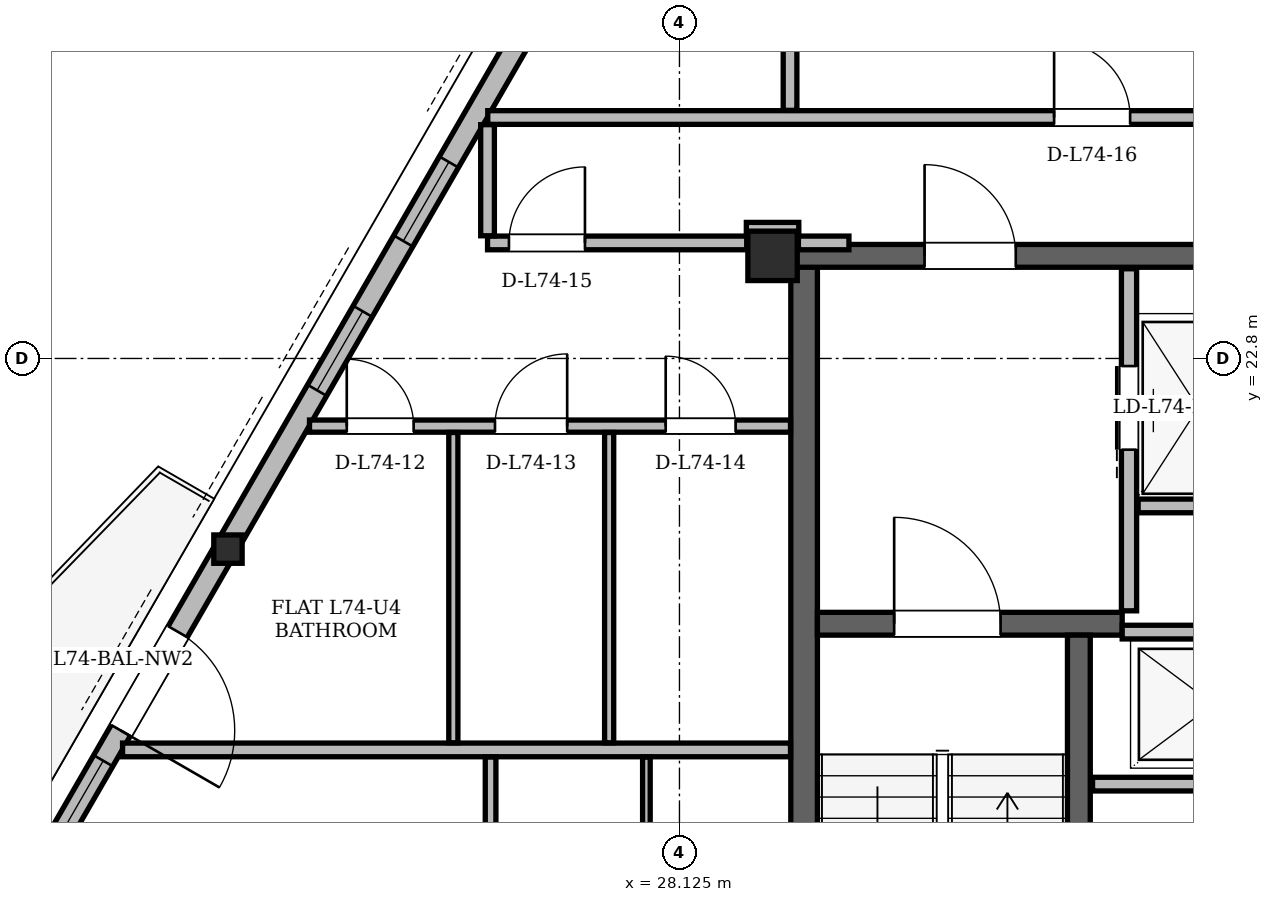
"""IFC4 building model, lengths in metres.
Left out: names, types, materials, properties, quantities, classifications, styles, units other than length and angle.
Written with IfcOpenShell. Run it as: python <this file> out.ifc"""

import sys

from ifc_helpers import new_model, si_unit, direction, frame, frame_2d, origin, origin_2d, place, context, subcontext, project, spatial, rectangle, hollow_rectangle, i_section, extrude, element, fill, save


model = new_model("IFC4")
c1 = context("Model", 3, precision=1e-05, world=origin(), true_north=direction((0.0, 1.0)))
c2 = subcontext(c1, "Body", "Model", "MODEL_VIEW")
j1 = project(units=[si_unit("LENGTHUNIT", "METRE"), si_unit("PLANEANGLEUNIT", "RADIAN")], contexts=[c1])
p1 = place(None, origin())
s1 = spatial("IfcSite", under=j1, at=p1, CompositionType="ELEMENT")
p2 = place(p1, origin())
s2 = spatial("IfcBuilding", under=s1, at=p2, CompositionType="ELEMENT")
p3 = place(p2, frame((0.0, 0.0, 281.1)))
s3 = spatial("IfcBuildingStorey", under=s2, at=p3, CompositionType="ELEMENT", Elevation=281.1)
p4 = place(p3, frame((29.35, 24.15, 0.0), z_axis=(0.0, 0.0, 1.0), x_axis=(1.0, 0.0, 0.0)))
e1 = element("IfcColumn", 1, at=p4, inside=s3, PredefinedType="COLUMN", context=c2, shape_type="SweptSolid", body=[
    extrude(hollow_rectangle(XDim=0.65, YDim=0.65, WallThickness=0.05, at=origin_2d()), origin(), (0.0, 0.0, 1.0), 3.9),
])
p5 = place(p3, frame((22.162, 20.31, 0.004), z_axis=(0.011731624298, -0.00953586574, 0.999885711597), x_axis=(0.630748834941, 0.775987053513, 0.0)))
e2 = element("IfcColumn", 2, at=p5, inside=s3, PredefinedType="COLUMN", context=c2, shape_type="SweptSolid", body=[
    extrude(i_section(OverallWidth=0.373, OverallDepth=0.373, WebThickness=0.016, FlangeThickness=0.026, at=origin_2d()), origin(), (0.0, 0.0, 1.0), 3.892),
])
p6 = place(p3, frame((29.765, 11.0, 0.0), z_axis=(0.0, 0.0, 1.0), x_axis=(0.0, 1.0, 0.0)))
e3 = element("IfcWall", 3, at=p6, inside=s3, PredefinedType="SHEAR", context=c2, shape_type="SweptSolid", body=[
    extrude(rectangle(XDim=13.3, YDim=0.35, at=frame_2d((6.65, 0.0))), origin(), (0.0, 0.0, 1.0), 3.68),
])
p7 = place(p3, frame((29.65, 24.15, 0.0), z_axis=(0.0, 0.0, 1.0), x_axis=(1.0, 0.0, 0.0)))
e4 = element("IfcWall", 4, at=p7, inside=s3, PredefinedType="SHEAR", context=c2, shape_type="SweptSolid", body=[
    extrude(rectangle(XDim=15.7, YDim=0.3, at=frame_2d((7.85, 0.0))), origin(), (0.0, 0.0, 1.0), 3.68),
])
p8 = place(p7, frame((1.7, 0.0, 0.0)))
e5 = element("IfcOpeningElement", 5, at=p8, cuts=e4, PredefinedType="OPENING", context=c2, shape_type="SweptSolid", body=[
    extrude(rectangle(XDim=1.2, YDim=2.2, at=frame_2d((0.6, 1.1))), frame((0.0, 0.15, 0.0), z_axis=(0.0, -1.0, 0.0), x_axis=(1.0, 0.0, 0.0)), (0.0, 0.0, 1.0), 0.3),
])
p9 = place(p7, frame((12.8, 0.0, 0.0)))
e6 = element("IfcOpeningElement", 6, at=p9, cuts=e4, PredefinedType="OPENING", context=c2, shape_type="SweptSolid", body=[
    extrude(rectangle(XDim=1.2, YDim=2.2, at=frame_2d((0.6, 1.1))), frame((0.0, 0.15, 0.0), z_axis=(0.0, -1.0, 0.0), x_axis=(1.0, 0.0, 0.0)), (0.0, 0.0, 1.0), 0.3),
])
p10 = place(p7, frame((6.55, 0.0, 0.0)))
e7 = element("IfcOpeningElement", 7, at=p10, cuts=e4, PredefinedType="OPENING", context=c2, shape_type="SweptSolid", body=[
    extrude(rectangle(XDim=0.9, YDim=2.05, at=frame_2d((0.45, 1.025))), frame((0.0, 0.15, 0.0), z_axis=(0.0, -1.0, 0.0), x_axis=(1.0, 0.0, 0.0)), (0.0, 0.0, 1.0), 0.3),
])
p11 = place(p7, frame((8.45, 0.0, 0.0)))
e8 = element("IfcOpeningElement", 8, at=p11, cuts=e4, PredefinedType="OPENING", context=c2, shape_type="SweptSolid", body=[
    extrude(rectangle(XDim=0.9, YDim=2.05, at=frame_2d((0.45, 1.025))), frame((0.0, 0.15, 0.0), z_axis=(0.0, -1.0, 0.0), x_axis=(1.0, 0.0, 0.0)), (0.0, 0.0, 1.0), 0.3),
])
p12 = place(p3, frame((29.94, 19.31, 0.0), z_axis=(0.0, 0.0, 1.0), x_axis=(1.0, 0.0, 0.0)))
e9 = element("IfcWall", 9, at=p12, inside=s3, PredefinedType="SHEAR", context=c2, shape_type="SweptSolid", body=[
    extrude(rectangle(XDim=4.01, YDim=0.3, at=frame_2d((2.005, 0.0))), origin(), (0.0, 0.0, 1.0), 3.68),
])
p13 = place(p12, frame((1.01, 0.0, 0.0)))
e10 = element("IfcOpeningElement", 10, at=p13, cuts=e9, PredefinedType="OPENING", context=c2, shape_type="SweptSolid", body=[
    extrude(rectangle(XDim=1.4, YDim=2.2, at=frame_2d((0.7, 1.1))), frame((0.0, 0.15, 0.0), z_axis=(0.0, -1.0, 0.0), x_axis=(1.0, 0.0, 0.0)), (0.0, 0.0, 1.0), 0.3),
])
p14 = place(p3, frame((33.38, 11.54, 0.0), z_axis=(0.0, 0.0, 1.0), x_axis=(0.0, 1.0, 0.0)))
e11 = element("IfcWall", 11, at=p14, inside=s3, PredefinedType="SHEAR", context=c2, shape_type="SweptSolid", body=[
    extrude(rectangle(XDim=7.62, YDim=0.3, at=frame_2d((3.81, 0.0))), origin(), (0.0, 0.0, 1.0), 3.68),
])
p15 = place(p3, frame((35.264, 43.004, 0.0), z_axis=(0.0, 0.0, 1.0), x_axis=(-0.500002460556, -0.866023983177, 0.0)))
e12 = element("IfcWall", 12, at=p15, inside=s3, PredefinedType="SOLIDWALL", context=c2, shape_type="SweptSolid", body=[
    extrude(rectangle(XDim=37.435, YDim=0.29, at=frame_2d((18.718, 0.0))), origin(), (0.0, 0.0, 1.0), 3.058),
])
p16 = place(p15, frame((3.639, 0.0, 0.0)))
e13 = element("IfcOpeningElement", 13, at=p16, cuts=e12, PredefinedType="OPENING", context=c2, shape_type="SweptSolid", body=[
    extrude(rectangle(XDim=1.5, YDim=2.2, at=frame_2d((0.75, 1.1))), frame((0.0, 0.145, 0.0), z_axis=(0.0, -1.0, 0.0), x_axis=(1.0, 0.0, 0.0)), (0.0, 0.0, 1.0), 0.29),
])
p17 = place(p15, frame((27.481, 0.0, 0.0)))
e14 = element("IfcOpeningElement", 14, at=p17, cuts=e12, PredefinedType="OPENING", context=c2, shape_type="SweptSolid", body=[
    extrude(rectangle(XDim=1.5, YDim=2.2, at=frame_2d((0.75, 1.1))), frame((0.0, 0.145, 0.0), z_axis=(0.0, -1.0, 0.0), x_axis=(1.0, 0.0, 0.0)), (0.0, 0.0, 1.0), 0.29),
])
p18 = place(p15, frame((35.251, 0.0, 0.85)))
e15 = element("IfcOpeningElement", 15, at=p18, cuts=e12, PredefinedType="OPENING", context=c2, shape_type="SweptSolid", body=[
    extrude(rectangle(XDim=1.2, YDim=1.48, at=frame_2d((0.6, 0.74))), frame((0.0, 0.145, 0.0), z_axis=(0.0, -1.0, 0.0), x_axis=(1.0, 0.0, 0.0)), (0.0, 0.0, 1.0), 0.29),
])
p19 = place(p15, frame((29.441, 0.0, 0.85)))
e16 = element("IfcOpeningElement", 16, at=p19, cuts=e12, PredefinedType="OPENING", context=c2, shape_type="SweptSolid", body=[
    extrude(rectangle(XDim=1.2, YDim=1.48, at=frame_2d((0.6, 0.74))), frame((0.0, 0.145, 0.0), z_axis=(0.0, -1.0, 0.0), x_axis=(1.0, 0.0, 0.0)), (0.0, 0.0, 1.0), 0.29),
])
p20 = place(p15, frame((32.709, 0.0, 0.85)))
e17 = element("IfcOpeningElement", 17, at=p20, cuts=e12, PredefinedType="OPENING", context=c2, shape_type="SweptSolid", body=[
    extrude(rectangle(XDim=1.2, YDim=1.48, at=frame_2d((0.6, 0.74))), frame((0.0, 0.145, 0.0), z_axis=(0.0, -1.0, 0.0), x_axis=(1.0, 0.0, 0.0)), (0.0, 0.0, 1.0), 0.29),
])
p21 = place(p15, frame((20.345, 0.0, 0.85)))
e18 = element("IfcOpeningElement", 18, at=p21, cuts=e12, PredefinedType="OPENING", context=c2, shape_type="SweptSolid", body=[
    extrude(rectangle(XDim=1.2, YDim=1.48, at=frame_2d((0.6, 0.74))), frame((0.0, 0.145, 0.0), z_axis=(0.0, -1.0, 0.0), x_axis=(1.0, 0.0, 0.0)), (0.0, 0.0, 1.0), 0.29),
])
p22 = place(p15, frame((22.614, 0.0, 0.85)))
e19 = element("IfcOpeningElement", 19, at=p22, cuts=e12, PredefinedType="OPENING", context=c2, shape_type="SweptSolid", body=[
    extrude(rectangle(XDim=1.2, YDim=1.48, at=frame_2d((0.6, 0.74))), frame((0.0, 0.145, 0.0), z_axis=(0.0, -1.0, 0.0), x_axis=(1.0, 0.0, 0.0)), (0.0, 0.0, 1.0), 0.29),
])
p23 = place(p15, frame((1.862, 0.0, 0.85)))
e20 = element("IfcOpeningElement", 20, at=p23, cuts=e12, PredefinedType="OPENING", context=c2, shape_type="SweptSolid", body=[
    extrude(rectangle(XDim=1.2, YDim=1.48, at=frame_2d((0.6, 0.74))), frame((0.0, 0.145, 0.0), z_axis=(0.0, -1.0, 0.0), x_axis=(1.0, 0.0, 0.0)), (0.0, 0.0, 1.0), 0.29),
])
p24 = place(p15, frame((8.825, 0.0, 0.85)))
e21 = element("IfcOpeningElement", 21, at=p24, cuts=e12, PredefinedType="OPENING", context=c2, shape_type="SweptSolid", body=[
    extrude(rectangle(XDim=1.2, YDim=1.48, at=frame_2d((0.6, 0.74))), frame((0.0, 0.145, 0.0), z_axis=(0.0, -1.0, 0.0), x_axis=(1.0, 0.0, 0.0)), (0.0, 0.0, 1.0), 0.29),
])
p25 = place(p3, frame((34.04, 19.48, 0.0), z_axis=(0.0, 0.0, 1.0), x_axis=(0.0, 1.0, 0.0)))
e22 = element("IfcWall", 22, at=p25, inside=s3, PredefinedType="PARTITIONING", context=c2, shape_type="SweptSolid", body=[
    extrude(rectangle(XDim=4.5, YDim=0.2, at=frame_2d((2.25, 0.0))), origin(), (0.0, 0.0, 1.0), 3.68),
])
p26 = place(p25, frame((2.12, 0.0, 0.0)))
e23 = element("IfcOpeningElement", 23, at=p26, cuts=e22, PredefinedType="OPENING", context=c2, shape_type="SweptSolid", body=[
    extrude(rectangle(XDim=1.1, YDim=2.2, at=frame_2d((0.55, 1.1))), frame((0.0, 0.1, 0.0), z_axis=(0.0, -1.0, 0.0), x_axis=(1.0, 0.0, 0.0)), (0.0, 0.0, 1.0), 0.2),
])
p27 = place(p3, frame((34.16, 20.86, 0.0), z_axis=(0.0, 0.0, 1.0), x_axis=(1.0, 0.0, 0.0)))
e24 = element("IfcWall", 24, at=p27, inside=s3, PredefinedType="PARTITIONING", context=c2, shape_type="SweptSolid", body=[
    extrude(rectangle(XDim=1.58, YDim=0.18, at=frame_2d((0.79, 0.0))), origin(), (0.0, 0.0, 1.0), 3.68),
])
p28 = place(p3, frame((33.95, 19.2, 0.0), z_axis=(0.0, 0.0, 1.0), x_axis=(1.0, 0.0, 0.0)))
e25 = element("IfcWall", 25, at=p28, inside=s3, PredefinedType="PARTITIONING", context=c2, shape_type="SweptSolid", body=[
    extrude(rectangle(XDim=2.27, YDim=0.18, at=frame_2d((1.135, 0.0))), origin(), (0.0, 0.0, 1.0), 3.68),
])
p29 = place(p3, frame((33.56, 17.2, 0.0), z_axis=(0.0, 0.0, 1.0), x_axis=(1.0, 0.0, 0.0)))
e26 = element("IfcWall", 26, at=p29, inside=s3, PredefinedType="PARTITIONING", context=c2, shape_type="SweptSolid", body=[
    extrude(rectangle(XDim=2.66, YDim=0.18, at=frame_2d((1.33, 0.0))), origin(), (0.0, 0.0, 1.0), 3.68),
])
p30 = place(p3, frame((20.798, 17.65, 0.0), z_axis=(0.0, 0.0, 1.0), x_axis=(1.0, 0.0, 0.0)))
e27 = element("IfcWall", 27, at=p30, inside=s3, PredefinedType="PARTITIONING", context=c2, shape_type="SweptSolid", body=[
    extrude(rectangle(XDim=8.788, YDim=0.18, at=frame_2d((4.394, 0.0))), origin(), (0.0, 0.0, 1.0), 2.82),
])
p31 = place(p3, frame((23.258, 21.91, 0.0), z_axis=(0.0, 0.0, 1.0), x_axis=(1.0, 0.0, 0.0)))
e28 = element("IfcWall", 28, at=p31, inside=s3, PredefinedType="PARTITIONING", context=c2, shape_type="SweptSolid", body=[
    extrude(rectangle(XDim=6.328, YDim=0.16, at=frame_2d((3.164, 0.0))), origin(), (0.0, 0.0, 1.0), 2.82),
])
p32 = place(p31, frame((0.49, 0.0, 0.0)))
e29 = element("IfcOpeningElement", 29, at=p32, cuts=e28, PredefinedType="OPENING", context=c2, shape_type="SweptSolid", body=[
    extrude(rectangle(XDim=0.88, YDim=2.08, at=frame_2d((0.44, 1.04))), frame((0.0, 0.08, 0.0), z_axis=(0.0, -1.0, 0.0), x_axis=(1.0, 0.0, 0.0)), (0.0, 0.0, 1.0), 0.16),
])
p33 = place(p31, frame((2.44, 0.0, 0.0)))
e30 = element("IfcOpeningElement", 30, at=p33, cuts=e28, PredefinedType="OPENING", context=c2, shape_type="SweptSolid", body=[
    extrude(rectangle(XDim=0.95, YDim=2.1, at=frame_2d((0.475, 1.05))), frame((0.0, 0.08, 0.0), z_axis=(0.0, -1.0, 0.0), x_axis=(1.0, 0.0, 0.0)), (0.0, 0.0, 1.0), 0.16),
])
p34 = place(p31, frame((4.686, 0.0, 0.0)))
e31 = element("IfcOpeningElement", 31, at=p34, cuts=e28, PredefinedType="OPENING", context=c2, shape_type="SweptSolid", body=[
    extrude(rectangle(XDim=0.92, YDim=2.12, at=frame_2d((0.46, 1.06))), frame((0.0, 0.08, 0.0), z_axis=(0.0, -1.0, 0.0), x_axis=(1.0, 0.0, 0.0)), (0.0, 0.0, 1.0), 0.16),
])
p35 = place(p3, frame((25.6, 24.32, 0.0), z_axis=(0.0, 0.0, 1.0), x_axis=(1.0, 0.0, 0.0)))
e32 = element("IfcWall", 32, at=p35, inside=s3, PredefinedType="PARTITIONING", context=c2, shape_type="SweptSolid", body=[
    extrude(rectangle(XDim=3.41, YDim=0.18, at=frame_2d((1.705, 0.0))), origin(), (0.0, 0.0, 1.0), 3.68),
])
p36 = place(p35, frame((0.282, 0.0, 0.0)))
e33 = element("IfcOpeningElement", 33, at=p36, cuts=e32, PredefinedType="OPENING", context=c2, shape_type="SweptSolid", body=[
    extrude(rectangle(XDim=1.0, YDim=2.18, at=frame_2d((0.5, 1.09))), frame((0.0, 0.09, 0.0), z_axis=(0.0, -1.0, 0.0), x_axis=(1.0, 0.0, 0.0)), (0.0, 0.0, 1.0), 0.18),
])
p37 = place(p3, frame((29.69, 24.32, 0.0), z_axis=(0.0, 0.0, 1.0), x_axis=(1.0, 0.0, 0.0)))
e34 = element("IfcWall", 34, at=p37, inside=s3, PredefinedType="PARTITIONING", context=c2, shape_type="SweptSolid", body=[
    extrude(rectangle(XDim=0.665, YDim=0.18, at=frame_2d((0.333, 0.0))), origin(), (0.0, 0.0, 1.0), 2.82),
])
p38 = place(p3, frame((29.005, 24.5, 0.0), z_axis=(0.0, 0.0, 1.0), x_axis=(1.0, 0.0, 0.0)))
e35 = element("IfcWall", 35, at=p38, inside=s3, PredefinedType="PARTITIONING", context=c2, shape_type="SweptSolid", body=[
    extrude(rectangle(XDim=0.69, YDim=0.18, at=frame_2d((0.345, 0.0))), origin(), (0.0, 0.0, 1.0), 3.266),
])
p39 = place(p3, frame((25.603, 25.97, 0.0), z_axis=(0.0, 0.0, 1.0), x_axis=(1.0, 0.0, 0.0)))
e36 = element("IfcWall", 36, at=p39, inside=s3, PredefinedType="PARTITIONING", context=c2, shape_type="SweptSolid", body=[
    extrude(rectangle(XDim=21.847, YDim=0.18, at=frame_2d((10.924, 0.0))), origin(), (0.0, 0.0, 1.0), 3.266),
])
p40 = place(p39, frame((7.452, 0.0, 0.0)))
e37 = element("IfcOpeningElement", 37, at=p40, cuts=e36, PredefinedType="OPENING", context=c2, shape_type="SweptSolid", body=[
    extrude(rectangle(XDim=1.0, YDim=2.18, at=frame_2d((0.5, 1.09))), frame((0.0, 0.09, 0.0), z_axis=(0.0, -1.0, 0.0), x_axis=(1.0, 0.0, 0.0)), (0.0, 0.0, 1.0), 0.18),
])
p41 = place(p39, frame((15.347, 0.0, 0.0)))
e38 = element("IfcOpeningElement", 38, at=p41, cuts=e36, PredefinedType="OPENING", context=c2, shape_type="SweptSolid", body=[
    extrude(rectangle(XDim=1.3, YDim=2.2, at=frame_2d((0.65, 1.1))), frame((0.0, 0.09, 0.0), z_axis=(0.0, -1.0, 0.0), x_axis=(1.0, 0.0, 0.0)), (0.0, 0.0, 1.0), 0.18),
])
p42 = place(p39, frame((18.938, 0.0, 0.0)))
e39 = element("IfcOpeningElement", 39, at=p42, cuts=e36, PredefinedType="OPENING", context=c2, shape_type="SweptSolid", body=[
    extrude(rectangle(XDim=1.0, YDim=2.18, at=frame_2d((0.5, 1.09))), frame((0.0, 0.09, 0.0), z_axis=(0.0, -1.0, 0.0), x_axis=(1.0, 0.0, 0.0)), (0.0, 0.0, 1.0), 0.18),
])
p43 = place(p3, frame((25.15, 17.744, 0.0), z_axis=(0.0, 0.0, 1.0), x_axis=(0.0, 1.0, 0.0)))
e40 = element("IfcWall", 40, at=p43, inside=s3, PredefinedType="PARTITIONING", context=c2, shape_type="SweptSolid", body=[
    extrude(rectangle(XDim=4.082, YDim=0.12, at=frame_2d((2.041, 0.0))), origin(), (0.0, 0.0, 1.0), 3.68),
])
p44 = place(p3, frame((25.6, 24.414, 0.0), z_axis=(0.0, 0.0, 1.0), x_axis=(0.0, 1.0, 0.0)))
e41 = element("IfcWall", 41, at=p44, inside=s3, PredefinedType="PARTITIONING", context=c2, shape_type="SweptSolid", body=[
    extrude(rectangle(XDim=1.462, YDim=0.18, at=frame_2d((0.731, 0.0))), origin(), (0.0, 0.0, 1.0), 3.68),
])
p45 = place(p3, frame((25.64, 12.954, 0.0), z_axis=(0.0, 0.0, 1.0), x_axis=(0.0, 1.0, 0.0)))
e42 = element("IfcWall", 42, at=p45, inside=s3, PredefinedType="PARTITIONING", context=c2, shape_type="SweptSolid", body=[
    extrude(rectangle(XDim=4.602, YDim=0.14, at=frame_2d((2.301, 0.0))), origin(), (0.0, 0.0, 1.0), 3.68),
])
p46 = place(p3, frame((27.2, 17.744, 0.0), z_axis=(0.0, 0.0, 1.0), x_axis=(0.0, 1.0, 0.0)))
e43 = element("IfcWall", 43, at=p46, inside=s3, PredefinedType="PARTITIONING", context=c2, shape_type="SweptSolid", body=[
    extrude(rectangle(XDim=4.082, YDim=0.12, at=frame_2d((2.041, 0.0))), origin(), (0.0, 0.0, 1.0), 3.68),
])
p47 = place(p3, frame((27.69, 12.954, 0.0), z_axis=(0.0, 0.0, 1.0), x_axis=(0.0, 1.0, 0.0)))
e44 = element("IfcWall", 44, at=p47, inside=s3, PredefinedType="PARTITIONING", context=c2, shape_type="SweptSolid", body=[
    extrude(rectangle(XDim=4.602, YDim=0.1, at=frame_2d((2.301, 0.0))), origin(), (0.0, 0.0, 1.0), 3.68),
])
p48 = place(p3, frame((29.58, 26.064, 0.0), z_axis=(0.0, 0.0, 1.0), x_axis=(0.0, 1.0, 0.0)))
e45 = element("IfcWall", 45, at=p48, inside=s3, PredefinedType="PARTITIONING", context=c2, shape_type="SweptSolid", body=[
    extrude(rectangle(XDim=6.797, YDim=0.18, at=frame_2d((3.398, 0.0))), origin(), (0.0, 0.0, 1.0), 3.058),
])
p49 = place(p17, origin())
e46 = element("IfcDoor", 46, at=p49, inside=s3, OperationType="SINGLE_SWING_RIGHT", PredefinedType="DOOR", context=c2, shape_type="SweptSolid", body=[
    extrude(rectangle(XDim=1.5, YDim=2.2, at=frame_2d((0.75, 1.1))), frame((0.0, 0.025, 0.0), z_axis=(0.0, -1.0, 0.0), x_axis=(1.0, 0.0, 0.0)), (0.0, 0.0, 1.0), 0.05),
])
fill(e14, e46)
p50 = place(p19, origin())
e47 = element("IfcWindow", 47, at=p50, inside=s3, PartitioningType="SINGLE_PANEL", PredefinedType="WINDOW", context=c2, shape_type="SweptSolid", body=[
    extrude(rectangle(XDim=1.2, YDim=1.48, at=frame_2d((0.6, 0.74))), frame((0.0, 0.03, 0.0), z_axis=(0.0, -1.0, 0.0), x_axis=(1.0, 0.0, 0.0)), (0.0, 0.0, 1.0), 0.06),
])
fill(e16, e47)
p51 = place(p21, origin())
e48 = element("IfcWindow", 48, at=p51, inside=s3, PartitioningType="SINGLE_PANEL", PredefinedType="WINDOW", context=c2, shape_type="SweptSolid", body=[
    extrude(rectangle(XDim=1.2, YDim=1.48, at=frame_2d((0.6, 0.74))), frame((0.0, 0.03, 0.0), z_axis=(0.0, -1.0, 0.0), x_axis=(1.0, 0.0, 0.0)), (0.0, 0.0, 1.0), 0.06),
])
fill(e18, e48)
p52 = place(p22, origin())
e49 = element("IfcWindow", 49, at=p52, inside=s3, PartitioningType="SINGLE_PANEL", PredefinedType="WINDOW", context=c2, shape_type="SweptSolid", body=[
    extrude(rectangle(XDim=1.2, YDim=1.48, at=frame_2d((0.6, 0.74))), frame((0.0, 0.03, 0.0), z_axis=(0.0, -1.0, 0.0), x_axis=(1.0, 0.0, 0.0)), (0.0, 0.0, 1.0), 0.06),
])
fill(e19, e49)
p53 = place(p26, origin())
e50 = element("IfcDoor", 50, at=p53, inside=s3, OperationType="SLIDING_TO_LEFT", PredefinedType="DOOR", context=c2, shape_type="SweptSolid", body=[
    extrude(rectangle(XDim=1.1, YDim=2.2, at=frame_2d((0.55, 1.1))), frame((0.0, 0.025, 0.0), z_axis=(0.0, -1.0, 0.0), x_axis=(1.0, 0.0, 0.0)), (0.0, 0.0, 1.0), 0.05),
])
fill(e23, e50)
p54 = place(p13, origin())
e51 = element("IfcDoor", 51, at=p54, inside=s3, OperationType="SINGLE_SWING_LEFT", PredefinedType="DOOR", context=c2, shape_type="SweptSolid", body=[
    extrude(rectangle(XDim=1.4, YDim=2.2, at=frame_2d((0.7, 1.1))), frame((0.0, 0.025, 0.0), z_axis=(0.0, -1.0, 0.0), x_axis=(1.0, 0.0, 0.0)), (0.0, 0.0, 1.0), 0.05),
])
fill(e10, e51)
p55 = place(p8, origin())
e52 = element("IfcDoor", 52, at=p55, inside=s3, OperationType="SINGLE_SWING_LEFT", PredefinedType="DOOR", context=c2, shape_type="SweptSolid", body=[
    extrude(rectangle(XDim=1.2, YDim=2.2, at=frame_2d((0.6, 1.1))), frame((0.0, 0.025, 0.0), z_axis=(0.0, -1.0, 0.0), x_axis=(1.0, 0.0, 0.0)), (0.0, 0.0, 1.0), 0.05),
])
fill(e5, e52)
p56 = place(p32, origin())
e53 = element("IfcDoor", 53, at=p56, inside=s3, OperationType="SINGLE_SWING_LEFT", PredefinedType="DOOR", context=c2, shape_type="SweptSolid", body=[
    extrude(rectangle(XDim=0.88, YDim=2.08, at=frame_2d((0.44, 1.04))), frame((0.0, 0.025, 0.0), z_axis=(0.0, -1.0, 0.0), x_axis=(1.0, 0.0, 0.0)), (0.0, 0.0, 1.0), 0.05),
])
fill(e29, e53)
p57 = place(p33, origin())
e54 = element("IfcDoor", 54, at=p57, inside=s3, OperationType="SINGLE_SWING_RIGHT", PredefinedType="DOOR", context=c2, shape_type="SweptSolid", body=[
    extrude(rectangle(XDim=0.95, YDim=2.1, at=frame_2d((0.475, 1.05))), frame((0.0, 0.025, 0.0), z_axis=(0.0, -1.0, 0.0), x_axis=(1.0, 0.0, 0.0)), (0.0, 0.0, 1.0), 0.05),
])
fill(e30, e54)
p58 = place(p34, origin())
e55 = element("IfcDoor", 55, at=p58, inside=s3, OperationType="SINGLE_SWING_LEFT", PredefinedType="DOOR", context=c2, shape_type="SweptSolid", body=[
    extrude(rectangle(XDim=0.92, YDim=2.12, at=frame_2d((0.46, 1.06))), frame((0.0, 0.025, 0.0), z_axis=(0.0, -1.0, 0.0), x_axis=(1.0, 0.0, 0.0)), (0.0, 0.0, 1.0), 0.05),
])
fill(e31, e55)
p59 = place(p36, origin())
e56 = element("IfcDoor", 56, at=p59, inside=s3, OperationType="SINGLE_SWING_RIGHT", PredefinedType="DOOR", context=c2, shape_type="SweptSolid", body=[
    extrude(rectangle(XDim=1.0, YDim=2.18, at=frame_2d((0.5, 1.09))), frame((0.0, 0.025, 0.0), z_axis=(0.0, -1.0, 0.0), x_axis=(1.0, 0.0, 0.0)), (0.0, 0.0, 1.0), 0.05),
])
fill(e33, e56)
p60 = place(p40, origin())
e57 = element("IfcDoor", 57, at=p60, inside=s3, OperationType="SINGLE_SWING_LEFT", PredefinedType="DOOR", context=c2, shape_type="SweptSolid", body=[
    extrude(rectangle(XDim=1.0, YDim=2.18, at=frame_2d((0.5, 1.09))), frame((0.0, 0.025, 0.0), z_axis=(0.0, -1.0, 0.0), x_axis=(1.0, 0.0, 0.0)), (0.0, 0.0, 1.0), 0.05),
])
fill(e37, e57)
save(model, sys.argv[1])
